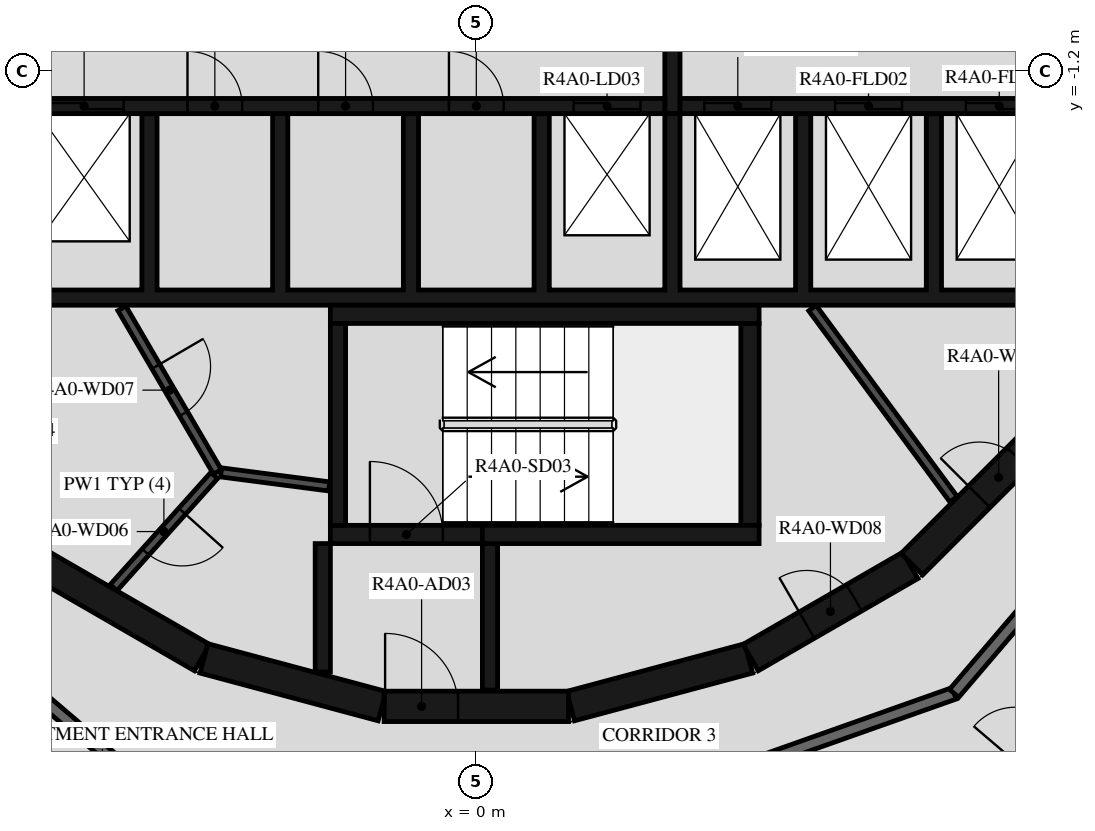
"""IFC4 building model, lengths in metres.
Left out: names, types, materials, properties, quantities, classifications, styles, units other than length and angle.
Written with IfcOpenShell. Run it as: python <this file> out.ifc"""

import sys

from ifc_helpers import new_model, si_unit, direction, frame, frame_2d, origin, place, context, subcontext, project, spatial, polyline, rectangle, outline, extrude, element, fill, save


model = new_model("IFC4")
c1 = context("Model", 3, precision=1e-05, world=origin(), true_north=direction((0.0, 1.0)))
c2 = subcontext(c1, "Body", "Model", "MODEL_VIEW")
j1 = project(units=[si_unit("LENGTHUNIT", "METRE"), si_unit("PLANEANGLEUNIT", "RADIAN")], contexts=[c1])
p1 = place(None, origin())
s1 = spatial("IfcSite", under=j1, at=p1, CompositionType="ELEMENT")
p2 = place(p1, origin())
s2 = spatial("IfcBuilding", under=s1, at=p2, CompositionType="ELEMENT")
p3 = place(p2, frame((0.0, 0.0, 151.7)))
s3 = spatial("IfcBuildingStorey", under=s2, at=p3, CompositionType="ELEMENT", Elevation=151.7)
p4 = place(p3, frame((1.55, -11.643, 0.0), z_axis=(0.0, 0.0, 1.0), x_axis=(0.965948410781, 0.258734743916, 0.0)))
e1 = element("IfcWall", 1, at=p4, inside=s3, PredefinedType="SHEAR", context=c2, shape_type="SweptSolid", body=[
    extrude(rectangle(XDim=3.033, YDim=0.5, at=frame_2d((1.516, 0.0))), origin(), (0.0, 0.0, 1.0), 3.12),
])
p5 = place(p3, frame((4.51, -10.845, 0.0), z_axis=(0.0, 0.0, 1.0), x_axis=(0.865975092491, 0.500087131594, 0.0)))
e2 = element("IfcWall", 2, at=p5, inside=s3, PredefinedType="SHEAR", context=c2, shape_type="SweptSolid", body=[
    extrude(rectangle(XDim=3.033, YDim=0.5, at=frame_2d((1.516, 0.0))), origin(), (0.0, 0.0, 1.0), 3.12),
])
p6 = place(p5, frame((1.066, 0.0, 0.0)))
e3 = element("IfcOpeningElement", 3, at=p6, cuts=e2, PredefinedType="OPENING", context=c2, shape_type="SweptSolid", body=[
    extrude(rectangle(XDim=0.9, YDim=2.1, at=frame_2d((0.45, 1.05))), frame((0.0, 0.26, 0.0), z_axis=(0.0, -1.0, 0.0), x_axis=(1.0, 0.0, 0.0)), (0.0, 0.0, 1.0), 0.52),
])
p7 = place(p3, frame((7.164, -9.308, 0.0), z_axis=(0.0, 0.0, 1.0), x_axis=(0.707106781187, 0.707106781187, 0.0)))
e4 = element("IfcWall", 4, at=p7, inside=s3, PredefinedType="SHEAR", context=c2, shape_type="SweptSolid", body=[
    extrude(rectangle(XDim=3.032, YDim=0.5, at=frame_2d((1.516, 0.0))), origin(), (0.0, 0.0, 1.0), 3.12),
])
p8 = place(p7, frame((1.566, 0.0, 0.0)))
e5 = element("IfcOpeningElement", 5, at=p8, cuts=e4, PredefinedType="OPENING", context=c2, shape_type="SweptSolid", body=[
    extrude(rectangle(XDim=0.9, YDim=2.1, at=frame_2d((0.45, 1.05))), frame((0.0, 0.26, 0.0), z_axis=(0.0, -1.0, 0.0), x_axis=(1.0, 0.0, 0.0)), (0.0, 0.0, 1.0), 0.52),
])
for number, where, z_axis, x_axis in (
    (6, (-7.137, -9.329, 0.0), (0.0, 0.0, 1.0), (0.866, -0.5, 0.0)),
    (7, (-4.479, -10.858, 0.0), (0.0, 0.0, 1.0), (0.966, -0.259, 0.0)),
):
    element("IfcWall", number, at=place(p3, frame(where, z_axis=z_axis, x_axis=x_axis)), inside=s3, PredefinedType="SHEAR", context=c2, shape_type="SweptSolid", body=[
        extrude(rectangle(XDim=3.033, YDim=0.5, at=frame_2d((1.516, 0.0))), origin(), (0.0, 0.0, 1.0), 3.12),
    ])
p9 = place(p3, frame((-1.516, -11.647, 0.0), z_axis=(0.0, 0.0, 1.0), x_axis=(1.0, 0.0, 0.0)))
e8 = element("IfcWall", 8, at=p9, inside=s3, PredefinedType="SHEAR", context=c2, shape_type="SweptSolid", body=[
    extrude(rectangle(XDim=3.033, YDim=0.5, at=frame_2d((1.516, 0.0))), origin(), (0.0, 0.0, 1.0), 3.12),
])
p10 = place(p9, frame((0.016, 0.0, 0.0)))
e9 = element("IfcOpeningElement", 9, at=p10, cuts=e8, PredefinedType="OPENING", context=c2, shape_type="SweptSolid", body=[
    extrude(rectangle(XDim=1.2, YDim=2.1, at=frame_2d((0.6, 1.05))), frame((0.0, 0.26, 0.0), z_axis=(0.0, -1.0, 0.0), x_axis=(1.0, 0.0, 0.0)), (0.0, 0.0, 1.0), 0.52),
])
p11 = place(p3, frame((-2.275, -8.67, 0.0), z_axis=(0.0, 0.0, 1.0), x_axis=(0.0, 1.0, 0.0)))
e10 = element("IfcWall", 10, at=p11, inside=s3, PredefinedType="SHEAR", context=c2, shape_type="SweptSolid", body=[
    extrude(rectangle(XDim=3.32, YDim=0.25, at=frame_2d((1.66, 0.0))), origin(), (0.0, 0.0, 1.0), 3.12),
])
p12 = place(p3, frame((-2.4, -5.2, 0.0), z_axis=(0.0, 0.0, 1.0), x_axis=(1.0, 0.0, 0.0)))
e11 = element("IfcWall", 11, at=p12, inside=s3, PredefinedType="SHEAR", context=c2, shape_type="SweptSolid", body=[
    extrude(rectangle(XDim=7.05, YDim=0.3, at=frame_2d((3.525, 0.0))), origin(), (0.0, 0.0, 1.0), 3.12),
])
p13 = place(p3, frame((4.5, -8.67, 0.0), z_axis=(0.0, 0.0, 1.0), x_axis=(0.0, 1.0, 0.0)))
e12 = element("IfcWall", 12, at=p13, inside=s3, PredefinedType="SHEAR", context=c2, shape_type="SweptSolid", body=[
    extrude(rectangle(XDim=3.32, YDim=0.3, at=frame_2d((1.66, 0.0))), origin(), (0.0, 0.0, 1.0), 3.12),
])
p14 = place(p3, frame((0.1, -8.82, 0.0), z_axis=(0.0, 0.0, 1.0), x_axis=(1.0, 0.0, 0.0)))
e13 = element("IfcWall", 13, at=p14, inside=s3, PredefinedType="SHEAR", context=c2, shape_type="SweptSolid", body=[
    extrude(rectangle(XDim=4.55, YDim=0.3, at=frame_2d((2.275, 0.0))), origin(), (0.0, 0.0, 1.0), 3.12),
])
p15 = place(p3, frame((-2.4, -8.82, 0.0), z_axis=(0.0, 0.0, 1.0), x_axis=(1.0, 0.0, 0.0)))
e14 = element("IfcWall", 14, at=p15, inside=s3, PredefinedType="SHEAR", context=c2, shape_type="SweptSolid", body=[
    extrude(rectangle(XDim=2.5, YDim=0.3, at=frame_2d((1.25, 0.0))), origin(), (0.0, 0.0, 1.0), 3.12),
])
p16 = place(p15, frame((0.65, 0.0, 0.0)))
e15 = element("IfcOpeningElement", 15, at=p16, cuts=e14, PredefinedType="OPENING", context=c2, shape_type="SweptSolid", body=[
    extrude(rectangle(XDim=1.2, YDim=2.1, at=frame_2d((0.6, 1.05))), frame((0.0, 0.16, 0.0), z_axis=(0.0, -1.0, 0.0), x_axis=(1.0, 0.0, 0.0)), (0.0, 0.0, 1.0), 0.32),
])
p17 = place(p3, frame((-2.525, -8.97, 0.0), z_axis=(0.0, 0.0, 1.0), x_axis=(0.0, -1.0, 0.0)))
e16 = element("IfcWall", 16, at=p17, inside=s3, PredefinedType="SHEAR", context=c2, shape_type="SweptSolid", body=[
    extrude(rectangle(XDim=2.11, YDim=0.25, at=frame_2d((1.055, 0.0))), origin(), (0.0, 0.0, 1.0), 3.12),
])
p18 = place(p3, frame((0.225, -8.97, 0.0), z_axis=(0.0, 0.0, 1.0), x_axis=(0.0, -1.0, 0.0)))
e17 = element("IfcWall", 17, at=p18, inside=s3, PredefinedType="SHEAR", context=c2, shape_type="SweptSolid", body=[
    extrude(rectangle(XDim=2.41, YDim=0.25, at=frame_2d((1.205, 0.0))), origin(), (0.0, 0.0, 1.0), 3.12),
])
p19 = place(p3, origin())
e18 = element("IfcWall", 18, at=p19, inside=s3, PredefinedType="SHEAR", context=c2, shape_type="SweptSolid", body=[
    extrude(outline(polyline([(9.8, -5.05), (9.8, -4.8), (9.8, -1.9), (9.55, -1.9), (9.55, -4.8), (7.65, -4.8), (7.65, -1.9), (7.4, -1.9), (7.4, -4.8), (5.5, -4.8), (5.5, -1.9), (5.25, -1.9), (5.25, -4.8), (3.35, -4.8), (3.35, -1.9), (3.1, -1.9), (3.1, -4.8), (1.2, -4.8), (1.2, -1.9), (0.95, -1.9), (0.95, -4.8), (-0.95, -4.8), (-0.95, -1.9), (-1.2, -1.9), (-1.2, -4.8), (-3.1, -4.8), (-3.1, -1.9), (-3.35, -1.9), (-3.35, -4.8), (-5.25, -4.8), (-5.25, -1.9), (-5.5, -1.9), (-5.5, -4.8), (-7.4, -4.8), (-7.4, -1.9), (-7.65, -1.9), (-7.65, -4.8), (-9.55, -4.8), (-9.55, -1.9), (-9.8, -1.9), (-9.8, -4.8), (-9.8, -5.05), (9.8, -5.05)])), origin(), (0.0, 0.0, 1.0), 3.12),
])
p20 = place(p3, frame((-11.28, -1.775, 0.0), z_axis=(0.0, 0.0, 1.0), x_axis=(1.0, 0.0, 0.0)))
e19 = element("IfcWall", 19, at=p20, inside=s3, PredefinedType="SHEAR", context=c2, shape_type="SweptSolid", body=[
    extrude(rectangle(XDim=14.38, YDim=0.25, at=frame_2d((7.19, 0.0))), origin(), (0.0, 0.0, 1.0), 3.12),
])
p21 = place(p20, frame((2.03, 0.0, 0.0)))
e20 = element("IfcOpeningElement", 20, at=p21, cuts=e19, PredefinedType="OPENING", context=c2, shape_type="SweptSolid", body=[
    extrude(rectangle(XDim=1.3, YDim=2.1, at=frame_2d((0.65, 1.05))), frame((0.0, 0.135, 0.0), z_axis=(0.0, -1.0, 0.0), x_axis=(1.0, 0.0, 0.0)), (0.0, 0.0, 1.0), 0.27),
])
p22 = place(p20, frame((4.18, 0.0, 0.0)))
e21 = element("IfcOpeningElement", 21, at=p22, cuts=e19, PredefinedType="OPENING", context=c2, shape_type="SweptSolid", body=[
    extrude(rectangle(XDim=1.3, YDim=2.1, at=frame_2d((0.65, 1.05))), frame((0.0, 0.135, 0.0), z_axis=(0.0, -1.0, 0.0), x_axis=(1.0, 0.0, 0.0)), (0.0, 0.0, 1.0), 0.27),
])
p23 = place(p20, frame((12.88, 0.0, 0.0)))
e22 = element("IfcOpeningElement", 22, at=p23, cuts=e19, PredefinedType="OPENING", context=c2, shape_type="SweptSolid", body=[
    extrude(rectangle(XDim=1.1, YDim=2.1, at=frame_2d((0.55, 1.05))), frame((0.0, 0.135, 0.0), z_axis=(0.0, -1.0, 0.0), x_axis=(1.0, 0.0, 0.0)), (0.0, 0.0, 1.0), 0.27),
])
p24 = place(p20, frame((6.53, 0.0, 0.0)))
e23 = element("IfcOpeningElement", 23, at=p24, cuts=e19, PredefinedType="OPENING", context=c2, shape_type="SweptSolid", body=[
    extrude(rectangle(XDim=0.9, YDim=2.1, at=frame_2d((0.45, 1.05))), frame((0.0, 0.135, 0.0), z_axis=(0.0, -1.0, 0.0), x_axis=(1.0, 0.0, 0.0)), (0.0, 0.0, 1.0), 0.27),
])
p25 = place(p20, frame((8.68, 0.0, 0.0)))
e24 = element("IfcOpeningElement", 24, at=p25, cuts=e19, PredefinedType="OPENING", context=c2, shape_type="SweptSolid", body=[
    extrude(rectangle(XDim=0.9, YDim=2.1, at=frame_2d((0.45, 1.05))), frame((0.0, 0.135, 0.0), z_axis=(0.0, -1.0, 0.0), x_axis=(1.0, 0.0, 0.0)), (0.0, 0.0, 1.0), 0.27),
])
p26 = place(p20, frame((10.83, 0.0, 0.0)))
e25 = element("IfcOpeningElement", 25, at=p26, cuts=e19, PredefinedType="OPENING", context=c2, shape_type="SweptSolid", body=[
    extrude(rectangle(XDim=0.9, YDim=2.1, at=frame_2d((0.45, 1.05))), frame((0.0, 0.135, 0.0), z_axis=(0.0, -1.0, 0.0), x_axis=(1.0, 0.0, 0.0)), (0.0, 0.0, 1.0), 0.27),
])
p27 = place(p3, frame((3.35, -1.775, 0.0), z_axis=(0.0, 0.0, 1.0), x_axis=(1.0, 0.0, 0.0)))
e26 = element("IfcWall", 26, at=p27, inside=s3, PredefinedType="SHEAR", context=c2, shape_type="SweptSolid", body=[
    extrude(rectangle(XDim=7.93, YDim=0.25, at=frame_2d((3.965, 0.0))), origin(), (0.0, 0.0, 1.0), 3.12),
])
p28 = place(p27, frame((0.4, 0.0, 0.0)))
e27 = element("IfcOpeningElement", 27, at=p28, cuts=e26, PredefinedType="OPENING", context=c2, shape_type="SweptSolid", body=[
    extrude(rectangle(XDim=1.1, YDim=2.4, at=frame_2d((0.55, 1.2))), frame((0.0, 0.135, 0.0), z_axis=(0.0, -1.0, 0.0), x_axis=(1.0, 0.0, 0.0)), (0.0, 0.0, 1.0), 0.27),
])
p29 = place(p27, frame((2.55, 0.0, 0.0)))
e28 = element("IfcOpeningElement", 28, at=p29, cuts=e26, PredefinedType="OPENING", context=c2, shape_type="SweptSolid", body=[
    extrude(rectangle(XDim=1.1, YDim=2.4, at=frame_2d((0.55, 1.2))), frame((0.0, 0.135, 0.0), z_axis=(0.0, -1.0, 0.0), x_axis=(1.0, 0.0, 0.0)), (0.0, 0.0, 1.0), 0.27),
])
p30 = place(p27, frame((4.7, 0.0, 0.0)))
e29 = element("IfcOpeningElement", 29, at=p30, cuts=e26, PredefinedType="OPENING", context=c2, shape_type="SweptSolid", body=[
    extrude(rectangle(XDim=1.1, YDim=2.4, at=frame_2d((0.55, 1.2))), frame((0.0, 0.135, 0.0), z_axis=(0.0, -1.0, 0.0), x_axis=(1.0, 0.0, 0.0)), (0.0, 0.0, 1.0), 0.27),
])
p31 = place(p3, frame((3.225, -1.9, 0.0), z_axis=(0.0, 0.0, 1.0), x_axis=(0.0, 1.0, 0.0)))
e30 = element("IfcWall", 30, at=p31, inside=s3, PredefinedType="SHEAR", context=c2, shape_type="SweptSolid", body=[
    extrude(rectangle(XDim=3.8, YDim=0.25, at=frame_2d((1.9, 0.0))), origin(), (0.0, 0.0, 1.0), 3.12),
])
p32 = place(p3, frame((5.528, -5.098, 0.0), z_axis=(0.0, 0.0, 1.0), x_axis=(0.594034318069, -0.804439698769, 0.0)))
e31 = element("IfcWall", 31, at=p32, inside=s3, PredefinedType="PARTITIONING", context=c2, shape_type="SweptSolid", body=[
    extrude(rectangle(XDim=3.907, YDim=0.15, at=frame_2d((1.953, 0.0))), origin(), (0.0, 0.0, 1.0), 3.12),
])
p33 = place(p3, frame((-5.829, -5.102, 0.0), z_axis=(0.0, 0.0, 1.0), x_axis=(0.504480008384, -0.863423373057, 0.0)))
e32 = element("IfcWall", 32, at=p33, inside=s3, PredefinedType="PARTITIONING", context=c2, shape_type="SweptSolid", body=[
    extrude(rectangle(XDim=3.115, YDim=0.15, at=frame_2d((1.558, 0.0))), origin(), (0.0, 0.0, 1.0), 3.12),
])
p34 = place(p33, frame((1.107, 0.0, 0.0)))
e33 = element("IfcOpeningElement", 33, at=p34, cuts=e32, PredefinedType="OPENING", context=c2, shape_type="SweptSolid", body=[
    extrude(rectangle(XDim=0.9, YDim=2.1, at=frame_2d((0.45, 1.05))), frame((0.0, 0.085, 0.0), z_axis=(0.0, -1.0, 0.0), x_axis=(1.0, 0.0, 0.0)), (0.0, 0.0, 1.0), 0.17),
])
p35 = place(p3, frame((-4.311, -7.851, 0.0), z_axis=(0.0, 0.0, 1.0), x_axis=(-0.667869133096, -0.744278725383, 0.0)))
e34 = element("IfcWall", 34, at=p35, inside=s3, PredefinedType="PARTITIONING", context=c2, shape_type="SweptSolid", body=[
    extrude(rectangle(XDim=2.476, YDim=0.15, at=frame_2d((1.238, 0.0))), origin(), (0.0, 0.0, 1.0), 3.12),
])
p36 = place(p35, frame((0.788, 0.0, 0.0)))
e35 = element("IfcOpeningElement", 35, at=p36, cuts=e34, PredefinedType="OPENING", context=c2, shape_type="SweptSolid", body=[
    extrude(rectangle(XDim=0.9, YDim=2.1, at=frame_2d((0.45, 1.05))), frame((0.0, 0.085, 0.0), z_axis=(0.0, -1.0, 0.0), x_axis=(1.0, 0.0, 0.0)), (0.0, 0.0, 1.0), 0.17),
])
p37 = place(p3, frame((-4.198, -7.799, 0.0), z_axis=(0.0, 0.0, 1.0), x_axis=(0.991686747293, -0.128675542523, 0.0)))
e36 = element("IfcWall", 36, at=p37, inside=s3, PredefinedType="PARTITIONING", context=c2, shape_type="SweptSolid", body=[
    extrude(rectangle(XDim=1.793, YDim=0.15, at=frame_2d((0.896, 0.0))), origin(), (0.0, 0.0, 1.0), 3.12),
])
p38 = place(p3, frame((-11.433, -7.858, 0.0), z_axis=(0.0, 0.0, 1.0), x_axis=(0.760412154545, -0.649440801937, 0.0)))
e37 = element("IfcWall", 37, at=p38, inside=s3, PredefinedType="STANDARD", context=c2, shape_type="SweptSolid", body=[
    extrude(rectangle(XDim=7.181, YDim=0.2, at=frame_2d((3.59, 0.0))), origin(), (0.0, 0.0, 1.0), 3.12),
])
p39 = place(p38, frame((2.39, 0.0, 0.0)))
e38 = element("IfcOpeningElement", 38, at=p39, cuts=e37, PredefinedType="OPENING", context=c2, shape_type="SweptSolid", body=[
    extrude(rectangle(XDim=1.0, YDim=2.1, at=frame_2d((0.5, 1.05))), frame((0.0, 0.11, 0.0), z_axis=(0.0, -1.0, 0.0), x_axis=(1.0, 0.0, 0.0)), (0.0, 0.0, 1.0), 0.22),
])
p40 = place(p3, frame((1.088, -13.83, 0.0), z_axis=(0.0, 0.0, 1.0), x_axis=(0.942648397945, 0.333787354241, 0.0)))
e39 = element("IfcWall", 39, at=p40, inside=s3, PredefinedType="STANDARD", context=c2, shape_type="SweptSolid", body=[
    extrude(rectangle(XDim=7.181, YDim=0.2, at=frame_2d((3.591, 0.0))), origin(), (0.0, 0.0, 1.0), 3.12),
])
p41 = place(p40, frame((0.2, 0.0, 0.0)))
e40 = element("IfcOpeningElement", 40, at=p41, cuts=e39, PredefinedType="OPENING", context=c2, shape_type="SweptSolid", body=[
    extrude(rectangle(XDim=1.0, YDim=2.1, at=frame_2d((0.5, 1.05))), frame((0.0, 0.11, 0.0), z_axis=(0.0, -1.0, 0.0), x_axis=(1.0, 0.0, 0.0)), (0.0, 0.0, 1.0), 0.22),
])
p42 = place(p3, frame((7.858, -11.433, 0.0), z_axis=(0.0, 0.0, 1.0), x_axis=(0.649440801937, 0.760412154545, 0.0)))
e41 = element("IfcWall", 41, at=p42, inside=s3, PredefinedType="STANDARD", context=c2, shape_type="SweptSolid", body=[
    extrude(rectangle(XDim=7.181, YDim=0.2, at=frame_2d((3.59, 0.0))), origin(), (0.0, 0.0, 1.0), 3.12),
])
p43 = place(p3, frame((8.737, -12.713, 0.0), z_axis=(0.0, 0.0, 1.0), x_axis=(0.649430604754, 0.760420863476, 0.0)))
e42 = element("IfcWall", 42, at=p43, inside=s3, PredefinedType="PARTITIONING", context=c2, shape_type="SweptSolid", body=[
    extrude(rectangle(XDim=7.985, YDim=0.12, at=frame_2d((3.992, 0.0))), origin(), (0.0, 0.0, 1.0), 3.12),
])
p44 = place(p43, frame((0.2, 0.0, 0.0)))
e43 = element("IfcOpeningElement", 43, at=p44, cuts=e42, PredefinedType="OPENING", context=c2, shape_type="SweptSolid", body=[
    extrude(rectangle(XDim=0.9, YDim=2.1, at=frame_2d((0.45, 1.05))), frame((0.0, 0.07, 0.0), z_axis=(0.0, -1.0, 0.0), x_axis=(1.0, 0.0, 0.0)), (0.0, 0.0, 1.0), 0.14),
])
p45 = place(p43, frame((6.234, 0.0, 0.0)))
e44 = element("IfcOpeningElement", 44, at=p45, cuts=e42, PredefinedType="OPENING", context=c2, shape_type="SweptSolid", body=[
    extrude(rectangle(XDim=0.8, YDim=2.1, at=frame_2d((0.4, 1.05))), frame((0.0, 0.07, 0.0), z_axis=(0.0, -1.0, 0.0), x_axis=(1.0, 0.0, 0.0)), (0.0, 0.0, 1.0), 0.14),
])
p46 = place(p16, origin())
e45 = element("IfcDoor", 45, at=p46, inside=s3, OperationType="SINGLE_SWING_LEFT", PredefinedType="DOOR", context=c2, shape_type="SweptSolid", body=[
    extrude(rectangle(XDim=1.2, YDim=2.1, at=frame_2d((0.6, 1.05))), frame((0.0, 0.025, 0.0), z_axis=(0.0, -1.0, 0.0), x_axis=(1.0, 0.0, 0.0)), (0.0, 0.0, 1.0), 0.05),
])
fill(e15, e45)
p47 = place(p10, origin())
e46 = element("IfcDoor", 46, at=p47, inside=s3, OperationType="SINGLE_SWING_RIGHT", PredefinedType="DOOR", context=c2, shape_type="SweptSolid", body=[
    extrude(rectangle(XDim=1.2, YDim=2.1, at=frame_2d((0.6, 1.05))), frame((0.0, 0.025, 0.0), z_axis=(0.0, -1.0, 0.0), x_axis=(1.0, 0.0, 0.0)), (0.0, 0.0, 1.0), 0.05),
])
fill(e9, e46)
p48 = place(p22, origin())
e47 = element("IfcDoor", 47, at=p48, inside=s3, OperationType="DOUBLE_DOOR_SLIDING", PredefinedType="DOOR", context=c2, shape_type="SweptSolid", body=[
    extrude(rectangle(XDim=1.3, YDim=2.1, at=frame_2d((0.65, 1.05))), frame((0.0, 0.025, 0.0), z_axis=(0.0, -1.0, 0.0), x_axis=(1.0, 0.0, 0.0)), (0.0, 0.0, 1.0), 0.05),
])
fill(e21, e47)
p49 = place(p23, origin())
e48 = element("IfcDoor", 48, at=p49, inside=s3, OperationType="DOUBLE_DOOR_SLIDING", PredefinedType="DOOR", context=c2, shape_type="SweptSolid", body=[
    extrude(rectangle(XDim=1.1, YDim=2.1, at=frame_2d((0.55, 1.05))), frame((0.0, 0.025, 0.0), z_axis=(0.0, -1.0, 0.0), x_axis=(1.0, 0.0, 0.0)), (0.0, 0.0, 1.0), 0.05),
])
fill(e22, e48)
p50 = place(p28, origin())
e49 = element("IfcDoor", 49, at=p50, inside=s3, OperationType="DOUBLE_DOOR_SLIDING", PredefinedType="DOOR", context=c2, shape_type="SweptSolid", body=[
    extrude(rectangle(XDim=1.1, YDim=2.4, at=frame_2d((0.55, 1.2))), frame((0.0, 0.025, 0.0), z_axis=(0.0, -1.0, 0.0), x_axis=(1.0, 0.0, 0.0)), (0.0, 0.0, 1.0), 0.05),
])
fill(e27, e49)
p51 = place(p29, origin())
e50 = element("IfcDoor", 50, at=p51, inside=s3, OperationType="DOUBLE_DOOR_SLIDING", PredefinedType="DOOR", context=c2, shape_type="SweptSolid", body=[
    extrude(rectangle(XDim=1.1, YDim=2.4, at=frame_2d((0.55, 1.2))), frame((0.0, 0.025, 0.0), z_axis=(0.0, -1.0, 0.0), x_axis=(1.0, 0.0, 0.0)), (0.0, 0.0, 1.0), 0.05),
])
fill(e28, e50)
p52 = place(p30, origin())
e51 = element("IfcDoor", 51, at=p52, inside=s3, OperationType="DOUBLE_DOOR_SLIDING", PredefinedType="DOOR", context=c2, shape_type="SweptSolid", body=[
    extrude(rectangle(XDim=1.1, YDim=2.4, at=frame_2d((0.55, 1.2))), frame((0.0, 0.025, 0.0), z_axis=(0.0, -1.0, 0.0), x_axis=(1.0, 0.0, 0.0)), (0.0, 0.0, 1.0), 0.05),
])
fill(e29, e51)
p53 = place(p24, origin())
e52 = element("IfcDoor", 52, at=p53, inside=s3, OperationType="SINGLE_SWING_LEFT", PredefinedType="DOOR", context=c2, shape_type="SweptSolid", body=[
    extrude(rectangle(XDim=0.9, YDim=2.1, at=frame_2d((0.45, 1.05))), frame((0.0, 0.025, 0.0), z_axis=(0.0, -1.0, 0.0), x_axis=(1.0, 0.0, 0.0)), (0.0, 0.0, 1.0), 0.05),
])
fill(e23, e52)
p54 = place(p25, origin())
e53 = element("IfcDoor", 53, at=p54, inside=s3, OperationType="SINGLE_SWING_RIGHT", PredefinedType="DOOR", context=c2, shape_type="SweptSolid", body=[
    extrude(rectangle(XDim=0.9, YDim=2.1, at=frame_2d((0.45, 1.05))), frame((0.0, 0.025, 0.0), z_axis=(0.0, -1.0, 0.0), x_axis=(1.0, 0.0, 0.0)), (0.0, 0.0, 1.0), 0.05),
])
fill(e24, e53)
p55 = place(p26, origin())
e54 = element("IfcDoor", 54, at=p55, inside=s3, OperationType="SINGLE_SWING_LEFT", PredefinedType="DOOR", context=c2, shape_type="SweptSolid", body=[
    extrude(rectangle(XDim=0.9, YDim=2.1, at=frame_2d((0.45, 1.05))), frame((0.0, 0.025, 0.0), z_axis=(0.0, -1.0, 0.0), x_axis=(1.0, 0.0, 0.0)), (0.0, 0.0, 1.0), 0.05),
])
fill(e25, e54)
p56 = place(p36, origin())
e55 = element("IfcDoor", 55, at=p56, inside=s3, OperationType="SINGLE_SWING_RIGHT", PredefinedType="DOOR", context=c2, shape_type="SweptSolid", body=[
    extrude(rectangle(XDim=0.9, YDim=2.1, at=frame_2d((0.45, 1.05))), frame((0.0, 0.025, 0.0), z_axis=(0.0, -1.0, 0.0), x_axis=(1.0, 0.0, 0.0)), (0.0, 0.0, 1.0), 0.05),
])
fill(e35, e55)
p57 = place(p34, origin())
e56 = element("IfcDoor", 56, at=p57, inside=s3, OperationType="SINGLE_SWING_LEFT", PredefinedType="DOOR", context=c2, shape_type="SweptSolid", body=[
    extrude(rectangle(XDim=0.9, YDim=2.1, at=frame_2d((0.45, 1.05))), frame((0.0, 0.025, 0.0), z_axis=(0.0, -1.0, 0.0), x_axis=(1.0, 0.0, 0.0)), (0.0, 0.0, 1.0), 0.05),
])
fill(e33, e56)
p58 = place(p6, origin())
e57 = element("IfcDoor", 57, at=p58, inside=s3, OperationType="SINGLE_SWING_RIGHT", PredefinedType="DOOR", context=c2, shape_type="SweptSolid", body=[
    extrude(rectangle(XDim=0.9, YDim=2.1, at=frame_2d((0.45, 1.05))), frame((0.0, 0.025, 0.0), z_axis=(0.0, -1.0, 0.0), x_axis=(1.0, 0.0, 0.0)), (0.0, 0.0, 1.0), 0.05),
])
fill(e3, e57)
p59 = place(p8, origin())
e58 = element("IfcDoor", 58, at=p59, inside=s3, OperationType="SINGLE_SWING_LEFT", PredefinedType="DOOR", context=c2, shape_type="SweptSolid", body=[
    extrude(rectangle(XDim=0.9, YDim=2.1, at=frame_2d((0.45, 1.05))), frame((0.0, 0.025, 0.0), z_axis=(0.0, -1.0, 0.0), x_axis=(1.0, 0.0, 0.0)), (0.0, 0.0, 1.0), 0.05),
])
fill(e5, e58)
p60 = place(p44, origin())
e59 = element("IfcDoor", 59, at=p60, inside=s3, OperationType="SINGLE_SWING_RIGHT", PredefinedType="DOOR", context=c2, shape_type="SweptSolid", body=[
    extrude(rectangle(XDim=0.9, YDim=2.1, at=frame_2d((0.45, 1.05))), frame((0.0, 0.025, 0.0), z_axis=(0.0, -1.0, 0.0), x_axis=(1.0, 0.0, 0.0)), (0.0, 0.0, 1.0), 0.05),
])
fill(e43, e59)
save(model, sys.argv[1])
